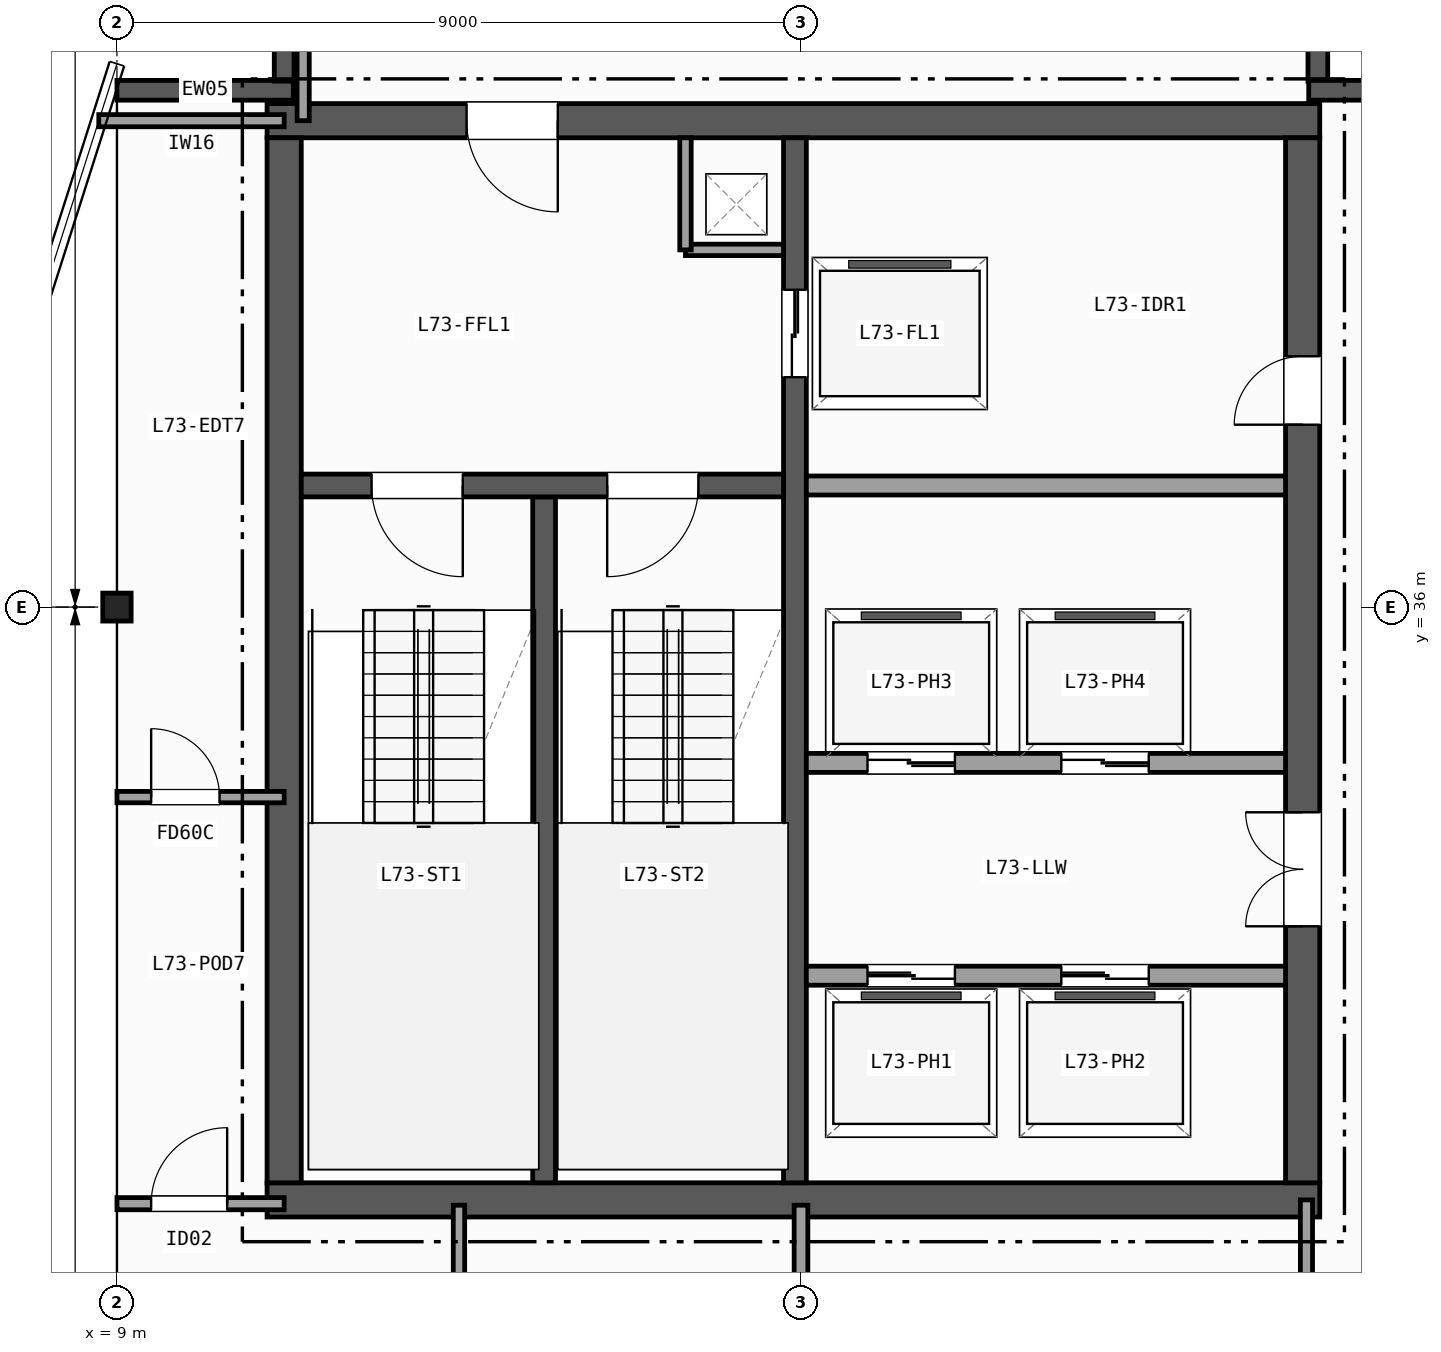
"""IFC4 building model, lengths in metres.
Left out: names, types, materials, properties, quantities, classifications, styles, units other than length and angle.
Written with IfcOpenShell. Run it as: python <this file> out.ifc"""

import sys

from ifc_helpers import new_model, si_unit, direction, frame, frame_2d, origin, origin_2d, place, context, subcontext, project, spatial, rectangle, i_section, extrude, element, fill, save


model = new_model("IFC4")
c1 = context("Model", 3, precision=1e-05, world=origin(), true_north=direction((0.0, 1.0)))
c2 = subcontext(c1, "Body", "Model", "MODEL_VIEW")
j1 = project(units=[si_unit("LENGTHUNIT", "METRE"), si_unit("PLANEANGLEUNIT", "RADIAN")], contexts=[c1])
p1 = place(None, origin())
s1 = spatial("IfcSite", under=j1, at=p1, CompositionType="ELEMENT")
p2 = place(p1, origin())
s2 = spatial("IfcBuilding", under=s1, at=p2, CompositionType="ELEMENT")
p3 = place(p2, frame((0.0, 0.0, 290.0)))
s3 = spatial("IfcBuildingStorey", under=s2, at=p3, CompositionType="ELEMENT", Elevation=290.0)
p4 = place(p3, frame((9.0, 36.0, 0.0), z_axis=(0.0, 0.0, 1.0), x_axis=(1.0, 0.0, 0.0)))
e1 = element("IfcColumn", 1, at=p4, inside=s3, PredefinedType="COLUMN", context=c2, shape_type="SweptSolid", body=[
    extrude(i_section(OverallWidth=0.373, OverallDepth=0.368, WebThickness=0.015, FlangeThickness=0.024, FilletRadius=0.015, at=origin_2d()), origin(), (0.0, 0.0, 1.0), 3.7),
])
p5 = place(p3, frame((9.0, 42.8, 0.0), z_axis=(0.0, 0.0, 1.0), x_axis=(1.0, 0.0, 0.0)))
e2 = element("IfcWall", 2, at=p5, inside=s3, PredefinedType="SOLIDWALL", context=c2, shape_type="SweptSolid", body=[
    extrude(rectangle(XDim=2.32, YDim=0.26, at=frame_2d((1.16, 0.0))), origin(), (0.0, 0.0, 1.0), 3.42),
])
for number, where, z_axis, x_axis in (
    (3, (11.2, 42.92, 0.0), (0.0, 0.0, 1.0), (0.0, 1.0, 0.0)),
    (4, (24.8, 45.0, 0.0), (0.0, 0.0, 1.0), (0.0, -1.0, 0.0)),
):
    element("IfcWall", number, at=place(p3, frame(where, z_axis=z_axis, x_axis=x_axis)), inside=s3, PredefinedType="SOLIDWALL", context=c2, shape_type="SweptSolid", body=[
        extrude(rectangle(XDim=2.08, YDim=0.26, at=frame_2d((1.04, 0.0))), origin(), (0.0, 0.0, 1.0), 3.42),
    ])
p6 = place(p3, frame((24.68, 42.8, 0.0), z_axis=(0.0, 0.0, 1.0), x_axis=(1.0, 0.0, 0.0)))
e5 = element("IfcWall", 5, at=p6, inside=s3, PredefinedType="SOLIDWALL", context=c2, shape_type="SweptSolid", body=[
    extrude(rectangle(XDim=2.32, YDim=0.26, at=frame_2d((1.16, 0.0))), origin(), (0.0, 0.0, 1.0), 3.42),
])
p7 = place(p3, frame((10.975, 28.2, 0.0), z_axis=(0.0, 0.0, 1.0), x_axis=(1.0, 0.0, 0.0)))
e6 = element("IfcWall", 6, at=p7, inside=s3, PredefinedType="SHEAR", context=c2, shape_type="SweptSolid", body=[
    extrude(rectangle(XDim=13.85, YDim=0.45, at=frame_2d((6.925, 0.0))), origin(), (0.0, 0.0, 1.0), 3.42),
])
p8 = place(p3, frame((24.825, 42.4, 0.0), z_axis=(0.0, 0.0, 1.0), x_axis=(-1.0, 0.0, 0.0)))
e7 = element("IfcWall", 7, at=p8, inside=s3, PredefinedType="SHEAR", context=c2, shape_type="SweptSolid", body=[
    extrude(rectangle(XDim=13.85, YDim=0.45, at=frame_2d((6.925, 0.0))), origin(), (0.0, 0.0, 1.0), 3.42),
])
p9 = place(p8, frame((10.025, 0.0, 0.0)))
e8 = element("IfcOpeningElement", 8, at=p9, cuts=e7, PredefinedType="OPENING", context=c2, shape_type="SweptSolid", body=[
    extrude(rectangle(XDim=1.2, YDim=2.15, at=frame_2d((0.6, 1.075))), frame((0.0, 0.235, 0.0), z_axis=(0.0, -1.0, 0.0), x_axis=(1.0, 0.0, 0.0)), (0.0, 0.0, 1.0), 0.47),
])
p10 = place(p3, frame((11.2, 42.175, 0.0), z_axis=(0.0, 0.0, 1.0), x_axis=(0.0, -1.0, 0.0)))
e9 = element("IfcWall", 9, at=p10, inside=s3, PredefinedType="SHEAR", context=c2, shape_type="SweptSolid", body=[
    extrude(rectangle(XDim=13.75, YDim=0.45, at=frame_2d((6.875, 0.0))), origin(), (0.0, 0.0, 1.0), 3.42),
])
p11 = place(p3, frame((24.6, 28.425, 0.0), z_axis=(0.0, 0.0, 1.0), x_axis=(0.0, 1.0, 0.0)))
e10 = element("IfcWall", 10, at=p11, inside=s3, PredefinedType="SHEAR", context=c2, shape_type="SweptSolid", body=[
    extrude(rectangle(XDim=13.75, YDim=0.45, at=frame_2d((6.875, 0.0))), origin(), (0.0, 0.0, 1.0), 3.42),
])
p12 = place(p11, frame((3.375, 0.0, 0.0)))
e11 = element("IfcOpeningElement", 11, at=p12, cuts=e10, PredefinedType="OPENING", context=c2, shape_type="SweptSolid", body=[
    extrude(rectangle(XDim=1.5, YDim=2.2, at=frame_2d((0.75, 1.1))), frame((0.0, 0.235, 0.0), z_axis=(0.0, -1.0, 0.0), x_axis=(1.0, 0.0, 0.0)), (0.0, 0.0, 1.0), 0.47),
])
p13 = place(p11, frame((9.975, 0.0, 0.0)))
e12 = element("IfcOpeningElement", 12, at=p13, cuts=e10, PredefinedType="OPENING", context=c2, shape_type="SweptSolid", body=[
    extrude(rectangle(XDim=0.9, YDim=2.1, at=frame_2d((0.45, 1.05))), frame((0.0, 0.235, 0.0), z_axis=(0.0, -1.0, 0.0), x_axis=(1.0, 0.0, 0.0)), (0.0, 0.0, 1.0), 0.47),
])
p14 = place(p3, frame((14.62, 28.425, 0.0), z_axis=(0.0, 0.0, 1.0), x_axis=(0.0, 1.0, 0.0)))
e13 = element("IfcWall", 13, at=p14, inside=s3, PredefinedType="SHEAR", context=c2, shape_type="SweptSolid", body=[
    extrude(rectangle(XDim=9.025, YDim=0.3, at=frame_2d((4.512, 0.0))), origin(), (0.0, 0.0, 1.0), 3.42),
])
p15 = place(p3, frame((17.92, 42.175, 0.0), z_axis=(0.0, 0.0, 1.0), x_axis=(0.0, -1.0, 0.0)))
e14 = element("IfcWall", 14, at=p15, inside=s3, PredefinedType="SHEAR", context=c2, shape_type="SweptSolid", body=[
    extrude(rectangle(XDim=13.75, YDim=0.3, at=frame_2d((6.875, 0.0))), origin(), (0.0, 0.0, 1.0), 3.42),
])
p16 = place(p15, frame((2.0, 0.0, 0.0)))
e15 = element("IfcOpeningElement", 15, at=p16, cuts=e14, PredefinedType="OPENING", context=c2, shape_type="SweptSolid", body=[
    extrude(rectangle(XDim=1.15, YDim=2.15, at=frame_2d((0.575, 1.075))), frame((0.0, 0.16, 0.0), z_axis=(0.0, -1.0, 0.0), x_axis=(1.0, 0.0, 0.0)), (0.0, 0.0, 1.0), 0.32),
])
p17 = place(p3, frame((17.77, 37.6, 0.0), z_axis=(0.0, 0.0, 1.0), x_axis=(-1.0, 0.0, 0.0)))
e16 = element("IfcWall", 16, at=p17, inside=s3, PredefinedType="SHEAR", context=c2, shape_type="SweptSolid", body=[
    extrude(rectangle(XDim=6.345, YDim=0.3, at=frame_2d((3.172, 0.0))), origin(), (0.0, 0.0, 1.0), 3.42),
])
p18 = place(p17, frame((4.22, 0.0, 0.0)))
e17 = element("IfcOpeningElement", 17, at=p18, cuts=e16, PredefinedType="OPENING", context=c2, shape_type="SweptSolid", body=[
    extrude(rectangle(XDim=1.2, YDim=2.15, at=frame_2d((0.6, 1.075))), frame((0.0, 0.16, 0.0), z_axis=(0.0, -1.0, 0.0), x_axis=(1.0, 0.0, 0.0)), (0.0, 0.0, 1.0), 0.32),
])
p19 = place(p17, frame((1.12, 0.0, 0.0)))
e18 = element("IfcOpeningElement", 18, at=p19, cuts=e16, PredefinedType="OPENING", context=c2, shape_type="SweptSolid", body=[
    extrude(rectangle(XDim=1.2, YDim=2.15, at=frame_2d((0.6, 1.075))), frame((0.0, 0.16, 0.0), z_axis=(0.0, -1.0, 0.0), x_axis=(1.0, 0.0, 0.0)), (0.0, 0.0, 1.0), 0.32),
])
p20 = place(p3, frame((16.48, 40.7, 0.0), z_axis=(0.0, 0.0, 1.0), x_axis=(1.0, 0.0, 0.0)))
e19 = element("IfcWall", 19, at=p20, inside=s3, PredefinedType="PARTITIONING", context=c2, shape_type="SweptSolid", body=[
    extrude(rectangle(XDim=1.29, YDim=0.15, at=frame_2d((0.645, 0.0))), origin(), (0.0, 0.0, 1.0), 3.42),
])
p21 = place(p3, frame((16.48, 40.7, 0.0), z_axis=(0.0, 0.0, 1.0), x_axis=(0.0, 1.0, 0.0)))
e20 = element("IfcWall", 20, at=p21, inside=s3, PredefinedType="PARTITIONING", context=c2, shape_type="SweptSolid", body=[
    extrude(rectangle(XDim=1.475, YDim=0.15, at=frame_2d((0.738, 0.0))), origin(), (0.0, 0.0, 1.0), 3.42),
])
p22 = place(p3, frame((18.07, 37.6, 0.0), z_axis=(0.0, 0.0, 1.0), x_axis=(1.0, 0.0, 0.0)))
e21 = element("IfcWall", 21, at=p22, inside=s3, PredefinedType="PARTITIONING", context=c2, shape_type="SweptSolid", body=[
    extrude(rectangle(XDim=6.305, YDim=0.25, at=frame_2d((3.152, 0.0))), origin(), (0.0, 0.0, 1.0), 3.42),
])
p23 = place(p3, frame((18.07, 31.15, 0.0), z_axis=(0.0, 0.0, 1.0), x_axis=(1.0, 0.0, 0.0)))
e22 = element("IfcWall", 22, at=p23, inside=s3, PredefinedType="PARTITIONING", context=c2, shape_type="SweptSolid", body=[
    extrude(rectangle(XDim=6.305, YDim=0.25, at=frame_2d((3.152, 0.0))), origin(), (0.0, 0.0, 1.0), 3.42),
])
p24 = place(p23, frame((0.805, 0.0, 0.0)))
e23 = element("IfcOpeningElement", 23, at=p24, cuts=e22, PredefinedType="OPENING", context=c2, shape_type="SweptSolid", body=[
    extrude(rectangle(XDim=1.15, YDim=2.15, at=frame_2d((0.575, 1.075))), frame((0.0, 0.135, 0.0), z_axis=(0.0, -1.0, 0.0), x_axis=(1.0, 0.0, 0.0)), (0.0, 0.0, 1.0), 0.27),
])
p25 = place(p23, frame((3.355, 0.0, 0.0)))
e24 = element("IfcOpeningElement", 24, at=p25, cuts=e22, PredefinedType="OPENING", context=c2, shape_type="SweptSolid", body=[
    extrude(rectangle(XDim=1.15, YDim=2.15, at=frame_2d((0.575, 1.075))), frame((0.0, 0.135, 0.0), z_axis=(0.0, -1.0, 0.0), x_axis=(1.0, 0.0, 0.0)), (0.0, 0.0, 1.0), 0.27),
])
p26 = place(p3, frame((24.375, 33.95, 0.0), z_axis=(0.0, 0.0, 1.0), x_axis=(-1.0, 0.0, 0.0)))
e25 = element("IfcWall", 25, at=p26, inside=s3, PredefinedType="PARTITIONING", context=c2, shape_type="SweptSolid", body=[
    extrude(rectangle(XDim=6.305, YDim=0.25, at=frame_2d((3.152, 0.0))), origin(), (0.0, 0.0, 1.0), 3.42),
])
p27 = place(p26, frame((4.35, 0.0, 0.0)))
e26 = element("IfcOpeningElement", 26, at=p27, cuts=e25, PredefinedType="OPENING", context=c2, shape_type="SweptSolid", body=[
    extrude(rectangle(XDim=1.15, YDim=2.15, at=frame_2d((0.575, 1.075))), frame((0.0, 0.135, 0.0), z_axis=(0.0, -1.0, 0.0), x_axis=(1.0, 0.0, 0.0)), (0.0, 0.0, 1.0), 0.27),
])
p28 = place(p26, frame((1.8, 0.0, 0.0)))
e27 = element("IfcOpeningElement", 27, at=p28, cuts=e25, PredefinedType="OPENING", context=c2, shape_type="SweptSolid", body=[
    extrude(rectangle(XDim=1.15, YDim=2.15, at=frame_2d((0.575, 1.075))), frame((0.0, 0.135, 0.0), z_axis=(0.0, -1.0, 0.0), x_axis=(1.0, 0.0, 0.0)), (0.0, 0.0, 1.0), 0.27),
])
p29 = place(p3, frame((9.0, 28.15, 0.0), z_axis=(0.0, 0.0, 1.0), x_axis=(1.0, 0.0, 0.0)))
e28 = element("IfcWall", 28, at=p29, inside=s3, PredefinedType="PARTITIONING", context=c2, shape_type="SweptSolid", body=[
    extrude(rectangle(XDim=2.2, YDim=0.16, at=frame_2d((1.1, 0.0))), origin(), (0.0, 0.0, 1.0), 2.707),
])
p30 = place(p29, frame((0.45, 0.0, 0.0)))
e29 = element("IfcOpeningElement", 29, at=p30, cuts=e28, PredefinedType="OPENING", context=c2, shape_type="SweptSolid", body=[
    extrude(rectangle(XDim=1.0, YDim=2.1, at=frame_2d((0.5, 1.05))), frame((0.0, 0.09, 0.0), z_axis=(0.0, -1.0, 0.0), x_axis=(1.0, 0.0, 0.0)), (0.0, 0.0, 1.0), 0.18),
])
p31 = place(p3, frame((8.761, 42.4, 0.0), z_axis=(0.0, 0.0, 1.0), x_axis=(1.0, 0.0, 0.0)))
e30 = element("IfcWall", 30, at=p31, inside=s3, PredefinedType="PARTITIONING", context=c2, shape_type="SweptSolid", body=[
    extrude(rectangle(XDim=2.439, YDim=0.16, at=frame_2d((1.219, 0.0))), origin(), (0.0, 0.0, 1.0), 3.42),
])
p32 = place(p3, frame((11.45, 42.4, 0.0), z_axis=(0.0, 0.0, 1.0), x_axis=(0.0, 1.0, 0.0)))
e31 = element("IfcWall", 31, at=p32, inside=s3, PredefinedType="PARTITIONING", context=c2, shape_type="SweptSolid", body=[
    extrude(rectangle(XDim=2.666, YDim=0.16, at=frame_2d((1.333, 0.0))), origin(), (0.0, 0.0, 1.0), 3.42),
])
p33 = place(p3, frame((9.0, 33.5, 0.0), z_axis=(0.0, 0.0, 1.0), x_axis=(1.0, 0.0, 0.0)))
e32 = element("IfcWall", 32, at=p33, inside=s3, PredefinedType="PARTITIONING", context=c2, shape_type="SweptSolid", body=[
    extrude(rectangle(XDim=2.2, YDim=0.15, at=frame_2d((1.1, 0.0))), origin(), (0.0, 0.0, 1.0), 2.707),
])
p34 = place(p33, frame((0.45, 0.0, 0.0)))
e33 = element("IfcOpeningElement", 33, at=p34, cuts=e32, PredefinedType="OPENING", context=c2, shape_type="SweptSolid", body=[
    extrude(rectangle(XDim=0.9, YDim=2.1, at=frame_2d((0.45, 1.05))), frame((0.0, 0.085, 0.0), z_axis=(0.0, -1.0, 0.0), x_axis=(1.0, 0.0, 0.0)), (0.0, 0.0, 1.0), 0.17),
])
p35 = place(p3, frame((24.65, 9.0, 0.0), z_axis=(0.0, 0.0, 1.0), x_axis=(0.0, 1.0, 0.0)))
e34 = element("IfcWall", 34, at=p35, inside=s3, PredefinedType="PARTITIONING", context=c2, shape_type="SweptSolid", body=[
    extrude(rectangle(XDim=19.2, YDim=0.16, at=frame_2d((9.6, 0.0))), origin(), (0.0, 0.0, 1.0), 2.707),
])
p36 = place(p35, frame((15.2, 0.0, 0.0)))
e35 = element("IfcOpeningElement", 35, at=p36, cuts=e34, PredefinedType="OPENING", context=c2, shape_type="SweptSolid", body=[
    extrude(rectangle(XDim=1.2, YDim=2.15, at=frame_2d((0.6, 1.075))), frame((0.0, 0.09, 0.0), z_axis=(0.0, -1.0, 0.0), x_axis=(1.0, 0.0, 0.0)), (0.0, 0.0, 1.0), 0.18),
])
p37 = place(p35, frame((10.5, 0.0, 0.0)))
e36 = element("IfcOpeningElement", 36, at=p37, cuts=e34, PredefinedType="OPENING", context=c2, shape_type="SweptSolid", body=[
    extrude(rectangle(XDim=0.86, YDim=2.05, at=frame_2d((0.43, 1.025))), frame((0.0, 0.09, 0.0), z_axis=(0.0, -1.0, 0.0), x_axis=(1.0, 0.0, 0.0)), (0.0, 0.0, 1.0), 0.18),
])
p38 = place(p35, frame((6.0, 0.0, 0.0)))
e37 = element("IfcOpeningElement", 37, at=p38, cuts=e34, PredefinedType="OPENING", context=c2, shape_type="SweptSolid", body=[
    extrude(rectangle(XDim=0.95, YDim=2.1, at=frame_2d((0.475, 1.05))), frame((0.0, 0.09, 0.0), z_axis=(0.0, -1.0, 0.0), x_axis=(1.0, 0.0, 0.0)), (0.0, 0.0, 1.0), 0.18),
])
p39 = place(p35, frame((2.55, 0.0, 0.0)))
e38 = element("IfcOpeningElement", 38, at=p39, cuts=e34, PredefinedType="OPENING", context=c2, shape_type="SweptSolid", body=[
    extrude(rectangle(XDim=1.0, YDim=2.1, at=frame_2d((0.5, 1.05))), frame((0.0, 0.09, 0.0), z_axis=(0.0, -1.0, 0.0), x_axis=(1.0, 0.0, 0.0)), (0.0, 0.0, 1.0), 0.18),
])
p40 = place(p3, frame((18.0, 9.0, 0.0), z_axis=(0.0, 0.0, 1.0), x_axis=(0.0, 1.0, 0.0)))
e39 = element("IfcWall", 39, at=p40, inside=s3, PredefinedType="PARTITIONING", context=c2, shape_type="SweptSolid", body=[
    extrude(rectangle(XDim=19.13, YDim=0.18, at=frame_2d((9.565, 0.0))), origin(), (0.0, 0.0, 1.0), 2.707),
])
p41 = place(p40, frame((11.5, 0.0, 0.0)))
e40 = element("IfcOpeningElement", 40, at=p41, cuts=e39, PredefinedType="OPENING", context=c2, shape_type="SweptSolid", body=[
    extrude(rectangle(XDim=1.05, YDim=2.15, at=frame_2d((0.525, 1.075))), frame((0.0, 0.1, 0.0), z_axis=(0.0, -1.0, 0.0), x_axis=(1.0, 0.0, 0.0)), (0.0, 0.0, 1.0), 0.2),
])
p42 = place(p40, frame((3.0, 0.0, 0.0)))
e41 = element("IfcOpeningElement", 41, at=p42, cuts=e39, PredefinedType="OPENING", context=c2, shape_type="SweptSolid", body=[
    extrude(rectangle(XDim=0.86, YDim=2.05, at=frame_2d((0.43, 1.025))), frame((0.0, 0.1, 0.0), z_axis=(0.0, -1.0, 0.0), x_axis=(1.0, 0.0, 0.0)), (0.0, 0.0, 1.0), 0.2),
])
p43 = place(p3, frame((13.5, 18.0, 0.0), z_axis=(0.0, 0.0, 1.0), x_axis=(0.0, 1.0, 0.0)))
e42 = element("IfcWall", 42, at=p43, inside=s3, PredefinedType="PARTITIONING", context=c2, shape_type="SweptSolid", body=[
    extrude(rectangle(XDim=10.13, YDim=0.15, at=frame_2d((5.065, 0.0))), origin(), (0.0, 0.0, 1.0), 2.789),
])
p44 = place(p43, frame((3.0, 0.0, 0.0)))
e43 = element("IfcOpeningElement", 43, at=p44, cuts=e42, PredefinedType="OPENING", context=c2, shape_type="SweptSolid", body=[
    extrude(rectangle(XDim=0.9, YDim=2.1, at=frame_2d((0.45, 1.05))), frame((0.0, 0.085, 0.0), z_axis=(0.0, -1.0, 0.0), x_axis=(1.0, 0.0, 0.0)), (0.0, 0.0, 1.0), 0.17),
])
p45 = place(p18, origin())
e44 = element("IfcDoor", 44, at=p45, inside=s3, OperationType="SINGLE_SWING_LEFT", PredefinedType="DOOR", context=c2, shape_type="SweptSolid", body=[
    extrude(rectangle(XDim=1.2, YDim=2.15, at=frame_2d((0.6, 1.075))), frame((0.0, 0.025, 0.0), z_axis=(0.0, -1.0, 0.0), x_axis=(1.0, 0.0, 0.0)), (0.0, 0.0, 1.0), 0.05),
])
fill(e17, e44)
p46 = place(p19, origin())
e45 = element("IfcDoor", 45, at=p46, inside=s3, OperationType="SINGLE_SWING_RIGHT", PredefinedType="DOOR", context=c2, shape_type="SweptSolid", body=[
    extrude(rectangle(XDim=1.2, YDim=2.15, at=frame_2d((0.6, 1.075))), frame((0.0, 0.025, 0.0), z_axis=(0.0, -1.0, 0.0), x_axis=(1.0, 0.0, 0.0)), (0.0, 0.0, 1.0), 0.05),
])
fill(e18, e45)
p47 = place(p12, origin())
e46 = element("IfcDoor", 46, at=p47, inside=s3, OperationType="DOUBLE_DOOR_SINGLE_SWING", PredefinedType="DOOR", context=c2, shape_type="SweptSolid", body=[
    extrude(rectangle(XDim=1.5, YDim=2.2, at=frame_2d((0.75, 1.1))), frame((0.0, 0.025, 0.0), z_axis=(0.0, -1.0, 0.0), x_axis=(1.0, 0.0, 0.0)), (0.0, 0.0, 1.0), 0.05),
])
fill(e11, e46)
p48 = place(p9, origin())
e47 = element("IfcDoor", 47, at=p48, inside=s3, OperationType="SINGLE_SWING_LEFT", PredefinedType="DOOR", context=c2, shape_type="SweptSolid", body=[
    extrude(rectangle(XDim=1.2, YDim=2.15, at=frame_2d((0.6, 1.075))), frame((0.0, 0.025, 0.0), z_axis=(0.0, -1.0, 0.0), x_axis=(1.0, 0.0, 0.0)), (0.0, 0.0, 1.0), 0.05),
])
fill(e8, e47)
p49 = place(p13, origin())
e48 = element("IfcDoor", 48, at=p49, inside=s3, OperationType="SINGLE_SWING_LEFT", PredefinedType="DOOR", context=c2, shape_type="SweptSolid", body=[
    extrude(rectangle(XDim=0.9, YDim=2.1, at=frame_2d((0.45, 1.05))), frame((0.0, 0.025, 0.0), z_axis=(0.0, -1.0, 0.0), x_axis=(1.0, 0.0, 0.0)), (0.0, 0.0, 1.0), 0.05),
])
fill(e12, e48)
p50 = place(p16, origin())
e49 = element("IfcDoor", 49, at=p50, inside=s3, OperationType="DOUBLE_DOOR_SLIDING", PredefinedType="DOOR", context=c2, shape_type="SweptSolid", body=[
    extrude(rectangle(XDim=1.15, YDim=2.15, at=frame_2d((0.575, 1.075))), frame((0.0, 0.025, 0.0), z_axis=(0.0, -1.0, 0.0), x_axis=(1.0, 0.0, 0.0)), (0.0, 0.0, 1.0), 0.05),
])
fill(e15, e49)
p51 = place(p24, origin())
e50 = element("IfcDoor", 50, at=p51, inside=s3, OperationType="DOUBLE_DOOR_SLIDING", PredefinedType="DOOR", context=c2, shape_type="SweptSolid", body=[
    extrude(rectangle(XDim=1.15, YDim=2.15, at=frame_2d((0.575, 1.075))), frame((0.0, 0.025, 0.0), z_axis=(0.0, -1.0, 0.0), x_axis=(1.0, 0.0, 0.0)), (0.0, 0.0, 1.0), 0.05),
])
fill(e23, e50)
p52 = place(p25, origin())
e51 = element("IfcDoor", 51, at=p52, inside=s3, OperationType="DOUBLE_DOOR_SLIDING", PredefinedType="DOOR", context=c2, shape_type="SweptSolid", body=[
    extrude(rectangle(XDim=1.15, YDim=2.15, at=frame_2d((0.575, 1.075))), frame((0.0, 0.025, 0.0), z_axis=(0.0, -1.0, 0.0), x_axis=(1.0, 0.0, 0.0)), (0.0, 0.0, 1.0), 0.05),
])
fill(e24, e51)
p53 = place(p27, origin())
e52 = element("IfcDoor", 52, at=p53, inside=s3, OperationType="DOUBLE_DOOR_SLIDING", PredefinedType="DOOR", context=c2, shape_type="SweptSolid", body=[
    extrude(rectangle(XDim=1.15, YDim=2.15, at=frame_2d((0.575, 1.075))), frame((0.0, 0.025, 0.0), z_axis=(0.0, -1.0, 0.0), x_axis=(1.0, 0.0, 0.0)), (0.0, 0.0, 1.0), 0.05),
])
fill(e26, e52)
p54 = place(p28, origin())
e53 = element("IfcDoor", 53, at=p54, inside=s3, OperationType="DOUBLE_DOOR_SLIDING", PredefinedType="DOOR", context=c2, shape_type="SweptSolid", body=[
    extrude(rectangle(XDim=1.15, YDim=2.15, at=frame_2d((0.575, 1.075))), frame((0.0, 0.025, 0.0), z_axis=(0.0, -1.0, 0.0), x_axis=(1.0, 0.0, 0.0)), (0.0, 0.0, 1.0), 0.05),
])
fill(e27, e53)
p55 = place(p30, origin())
e54 = element("IfcDoor", 54, at=p55, inside=s3, OperationType="SINGLE_SWING_RIGHT", PredefinedType="DOOR", context=c2, shape_type="SweptSolid", body=[
    extrude(rectangle(XDim=1.0, YDim=2.1, at=frame_2d((0.5, 1.05))), frame((0.0, 0.025, 0.0), z_axis=(0.0, -1.0, 0.0), x_axis=(1.0, 0.0, 0.0)), (0.0, 0.0, 1.0), 0.05),
])
fill(e29, e54)
p56 = place(p34, origin())
e55 = element("IfcDoor", 55, at=p56, inside=s3, OperationType="SINGLE_SWING_LEFT", PredefinedType="DOOR", context=c2, shape_type="SweptSolid", body=[
    extrude(rectangle(XDim=0.9, YDim=2.1, at=frame_2d((0.45, 1.05))), frame((0.0, 0.025, 0.0), z_axis=(0.0, -1.0, 0.0), x_axis=(1.0, 0.0, 0.0)), (0.0, 0.0, 1.0), 0.05),
])
fill(e33, e55)
save(model, sys.argv[1])
